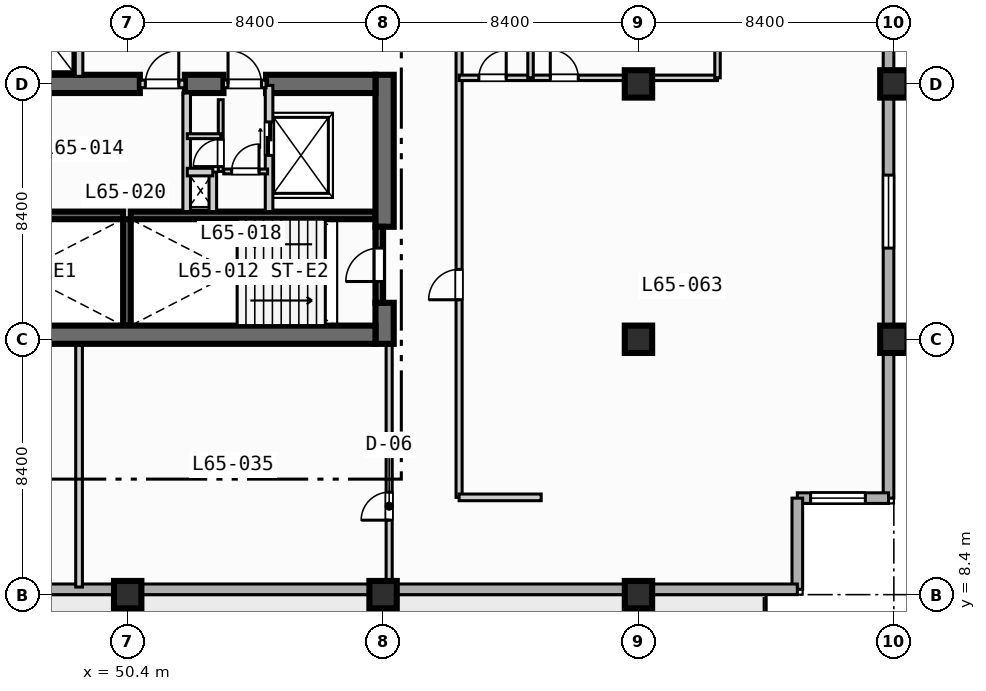
"""IFC4 building model, lengths in metres.
Left out: names, types, materials, properties, quantities, classifications, styles, units other than length and angle.
Written with IfcOpenShell. Run it as: python <this file> out.ifc"""

import sys

from ifc_helpers import new_model, si_unit, direction, frame, frame_2d, origin, origin_2d, place, context, subcontext, project, spatial, rectangle, extrude, element, fill, save


model = new_model("IFC4")
c1 = context("Model", 3, precision=1e-05, world=origin(), true_north=direction((0.0, 1.0)))
c2 = subcontext(c1, "Body", "Model", "MODEL_VIEW")
j1 = project(units=[si_unit("LENGTHUNIT", "METRE"), si_unit("PLANEANGLEUNIT", "RADIAN")], contexts=[c1])
p1 = place(None, origin())
s1 = spatial("IfcSite", under=j1, at=p1, CompositionType="ELEMENT")
p2 = place(p1, origin())
s2 = spatial("IfcBuilding", under=s1, at=p2, CompositionType="ELEMENT")
p3 = place(p2, frame((0.0, 0.0, 263.8)))
s3 = spatial("IfcBuildingStorey", under=s2, at=p3, CompositionType="ELEMENT", Elevation=263.8)
for number, where, z_axis, x_axis in (
    (1, (42.2, 20.875, 0.0), (0.0, 0.0, 1.0), (1.0, 0.0, 0.0)),
    (2, (50.5, 20.875, 0.0), (0.0, 0.0, 1.0), (1.0, 0.0, 0.0)),
):
    element("IfcWall", number, at=place(p3, frame(where, z_axis=z_axis, x_axis=x_axis)), inside=s3, PredefinedType="SOLIDWALL", context=c2, shape_type="SweptSolid", body=[
        extrude(rectangle(XDim=8.05, YDim=0.25, at=frame_2d((4.025, 0.0))), origin(), (0.0, 0.0, 1.0), 3.47),
    ])
p4 = place(p3, frame((50.375, 17.25, 0.0), z_axis=(0.0, 0.0, 1.0), x_axis=(0.0, 1.0, 0.0)))
e3 = element("IfcWall", 3, at=p4, inside=s3, PredefinedType="SOLIDWALL", context=c2, shape_type="SweptSolid", body=[
    extrude(rectangle(XDim=3.5, YDim=0.25, at=frame_2d((1.75, 0.0))), origin(), (0.0, 0.0, 1.0), 3.47),
])
p5 = place(p3, frame((58.85, 16.65, 0.0), z_axis=(0.0, 0.0, 1.0), x_axis=(0.0, 1.0, 0.0)))
e4 = element("IfcWall", 4, at=p5, inside=s3, PredefinedType="SHEAR", context=c2, shape_type="SweptSolid", body=[
    extrude(rectangle(XDim=1.35, YDim=0.6, at=frame_2d((0.675, 0.0))), origin(), (0.0, 0.0, 1.0), 3.47),
])
p6 = place(p3, frame((58.85, 20.5, 0.0), z_axis=(0.0, 0.0, 1.0), x_axis=(0.0, 1.0, 0.0)))
e5 = element("IfcWall", 5, at=p6, inside=s3, PredefinedType="SHEAR", context=c2, shape_type="SweptSolid", body=[
    extrude(rectangle(XDim=5.0, YDim=0.6, at=frame_2d((2.5, 0.0))), origin(), (0.0, 0.0, 1.0), 3.47),
])
p7 = place(p3, frame((42.2, 16.95, 0.0), z_axis=(0.0, 0.0, 1.0), x_axis=(1.0, 0.0, 0.0)))
e6 = element("IfcWall", 6, at=p7, inside=s3, PredefinedType="SHEAR", context=c2, shape_type="SweptSolid", body=[
    extrude(rectangle(XDim=16.35, YDim=0.6, at=frame_2d((8.175, 0.0))), origin(), (0.0, 0.0, 1.0), 3.47),
])
p8 = place(p3, frame((42.2, 25.2, 0.0), z_axis=(0.0, 0.0, 1.0), x_axis=(1.0, 0.0, 0.0)))
e7 = element("IfcWall", 7, at=p8, inside=s3, PredefinedType="SHEAR", context=c2, shape_type="SweptSolid", body=[
    extrude(rectangle(XDim=8.6, YDim=0.6, at=frame_2d((4.3, 0.0))), origin(), (0.0, 0.0, 1.0), 3.47),
])
p9 = place(p3, frame((52.28, 25.2, 0.0), z_axis=(0.0, 0.0, 1.0), x_axis=(1.0, 0.0, 0.0)))
e8 = element("IfcWall", 8, at=p9, inside=s3, PredefinedType="SHEAR", context=c2, shape_type="SweptSolid", body=[
    extrude(rectangle(XDim=1.27, YDim=0.6, at=frame_2d((0.635, 0.0))), origin(), (0.0, 0.0, 1.0), 3.47),
])
p10 = place(p3, frame((54.95, 25.2, 0.0), z_axis=(0.0, 0.0, 1.0), x_axis=(1.0, 0.0, 0.0)))
e9 = element("IfcWall", 9, at=p10, inside=s3, PredefinedType="SHEAR", context=c2, shape_type="SweptSolid", body=[
    extrude(rectangle(XDim=3.6, YDim=0.6, at=frame_2d((1.8, 0.0))), origin(), (0.0, 0.0, 1.0), 3.47),
])
for number, where, z_axis, x_axis in (
    (10, (50.4, 8.4, 0.0), (0.0, 0.0, 1.0), (1.0, 0.0, 0.0)),
    (11, (58.8, 8.4, 0.0), (0.0, 0.0, 1.0), (1.0, 0.0, 0.0)),
    (12, (67.2, 8.4, 0.0), (0.0, 0.0, 1.0), (1.0, 0.0, 0.0)),
    (13, (67.2, 16.8, 0.0), (0.0, 0.0, 1.0), (1.0, 0.0, 0.0)),
    (14, (67.2, 25.2, 0.0), (0.0, 0.0, 1.0), (1.0, 0.0, 0.0)),
    (15, (75.6, 16.8, 0.0), (0.0, 0.0, 1.0), (1.0, 0.0, 0.0)),
    (16, (75.6, 25.2, 0.0), (0.0, 0.0, 1.0), (1.0, 0.0, 0.0)),
):
    element("IfcColumn", number, at=place(p3, frame(where, z_axis=z_axis, x_axis=x_axis)), inside=s3, PredefinedType="COLUMN", context=c2, shape_type="SweptSolid", body=[
        extrude(rectangle(XDim=0.9, YDim=0.9, at=origin_2d()), origin(), (0.0, 0.0, 1.0), 3.7),
    ])
p11 = place(p3, frame((75.425, 30.425, 0.0), z_axis=(0.0, 0.0, 1.0), x_axis=(0.0, -1.0, 0.0)))
e17 = element("IfcWall", 17, at=p11, inside=s3, PredefinedType="STANDARD", context=c2, shape_type="SweptSolid", body=[
    extrude(rectangle(XDim=18.85, YDim=0.35, at=frame_2d((9.425, 0.0))), origin(), (0.0, 0.0, 1.0), 3.47),
])
p12 = place(p11, frame((8.225, 0.0, 0.85)))
e18 = element("IfcOpeningElement", 18, at=p12, cuts=e17, PredefinedType="OPENING", context=c2, shape_type="SweptSolid", body=[
    extrude(rectangle(XDim=2.4, YDim=1.95, at=frame_2d((1.2, 0.975))), frame((0.0, 0.185, 0.0), z_axis=(0.0, -1.0, 0.0), x_axis=(1.0, 0.0, 0.0)), (0.0, 0.0, 1.0), 0.37),
])
p13 = place(p3, frame((75.425, 11.575, 0.0), z_axis=(0.0, 0.0, 1.0), x_axis=(-1.0, 0.0, 0.0)))
e19 = element("IfcWall", 19, at=p13, inside=s3, PredefinedType="STANDARD", context=c2, shape_type="SweptSolid", body=[
    extrude(rectangle(XDim=3.0, YDim=0.35, at=frame_2d((1.5, 0.0))), origin(), (0.0, 0.0, 1.0), 3.47),
])
p14 = place(p13, frame((0.762, 0.0, 0.85)))
e20 = element("IfcOpeningElement", 20, at=p14, cuts=e19, PredefinedType="OPENING", context=c2, shape_type="SweptSolid", body=[
    extrude(rectangle(XDim=1.8, YDim=1.8, at=frame_2d((0.9, 0.9))), frame((0.0, 0.185, 0.0), z_axis=(0.0, -1.0, 0.0), x_axis=(1.0, 0.0, 0.0)), (0.0, 0.0, 1.0), 0.37),
])
p15 = place(p3, frame((72.425, 11.575, 0.0), z_axis=(0.0, 0.0, 1.0), x_axis=(0.0, -1.0, 0.0)))
e21 = element("IfcWall", 21, at=p15, inside=s3, PredefinedType="STANDARD", context=c2, shape_type="SweptSolid", body=[
    extrude(rectangle(XDim=3.0, YDim=0.35, at=frame_2d((1.5, 0.0))), origin(), (0.0, 0.0, 1.0), 3.47),
])
p16 = place(p3, frame((72.425, 8.575, 0.0), z_axis=(0.0, 0.0, 1.0), x_axis=(-1.0, 0.0, 0.0)))
e22 = element("IfcWall", 22, at=p16, inside=s3, PredefinedType="STANDARD", context=c2, shape_type="SweptSolid", body=[
    extrude(rectangle(XDim=60.85, YDim=0.35, at=frame_2d((30.425, 0.0))), origin(), (0.0, 0.0, 1.0), 3.47),
])
p17 = place(p16, frame((41.325, 0.0, 0.0)))
e23 = element("IfcOpeningElement", 23, at=p17, cuts=e22, PredefinedType="OPENING", context=c2, shape_type="SweptSolid", body=[
    extrude(rectangle(XDim=1.4, YDim=2.2, at=frame_2d((0.7, 1.1))), frame((0.0, 0.185, 0.0), z_axis=(0.0, -1.0, 0.0), x_axis=(1.0, 0.0, 0.0)), (0.0, 0.0, 1.0), 0.37),
])
p18 = place(p16, frame((50.225, 0.0, 0.85)))
e24 = element("IfcOpeningElement", 24, at=p18, cuts=e22, PredefinedType="OPENING", context=c2, shape_type="SweptSolid", body=[
    extrude(rectangle(XDim=2.4, YDim=1.95, at=frame_2d((1.2, 0.975))), frame((0.0, 0.185, 0.0), z_axis=(0.0, -1.0, 0.0), x_axis=(1.0, 0.0, 0.0)), (0.0, 0.0, 1.0), 0.37),
])
p19 = place(p16, frame((33.425, 0.0, 0.85)))
e25 = element("IfcOpeningElement", 25, at=p19, cuts=e22, PredefinedType="OPENING", context=c2, shape_type="SweptSolid", body=[
    extrude(rectangle(XDim=2.4, YDim=1.95, at=frame_2d((1.2, 0.975))), frame((0.0, 0.185, 0.0), z_axis=(0.0, -1.0, 0.0), x_axis=(1.0, 0.0, 0.0)), (0.0, 0.0, 1.0), 0.37),
])
p20 = place(p16, frame((25.325, 0.0, 0.85)))
e26 = element("IfcOpeningElement", 26, at=p20, cuts=e22, PredefinedType="OPENING", context=c2, shape_type="SweptSolid", body=[
    extrude(rectangle(XDim=1.8, YDim=1.8, at=frame_2d((0.9, 0.9))), frame((0.0, 0.185, 0.0), z_axis=(0.0, -1.0, 0.0), x_axis=(1.0, 0.0, 0.0)), (0.0, 0.0, 1.0), 0.37),
])
p21 = place(p16, frame((58.15, 0.0, 0.85)))
e27 = element("IfcOpeningElement", 27, at=p21, cuts=e22, PredefinedType="OPENING", context=c2, shape_type="SweptSolid", body=[
    extrude(rectangle(XDim=1.8, YDim=1.8, at=frame_2d((0.9, 0.9))), frame((0.0, 0.185, 0.0), z_axis=(0.0, -1.0, 0.0), x_axis=(1.0, 0.0, 0.0)), (0.0, 0.0, 1.0), 0.37),
])
p22 = place(p16, frame((56.29, 0.0, 0.85)))
e28 = element("IfcOpeningElement", 28, at=p22, cuts=e22, PredefinedType="OPENING", context=c2, shape_type="SweptSolid", body=[
    extrude(rectangle(XDim=0.72, YDim=1.8, at=frame_2d((0.36, 0.9))), frame((0.0, 0.185, 0.0), z_axis=(0.0, -1.0, 0.0), x_axis=(1.0, 0.0, 0.0)), (0.0, 0.0, 1.0), 0.37),
])
p23 = place(p16, frame((44.15, 0.0, 0.85)))
e29 = element("IfcOpeningElement", 29, at=p23, cuts=e22, PredefinedType="OPENING", context=c2, shape_type="SweptSolid", body=[
    extrude(rectangle(XDim=1.8, YDim=1.8, at=frame_2d((0.9, 0.9))), frame((0.0, 0.185, 0.0), z_axis=(0.0, -1.0, 0.0), x_axis=(1.0, 0.0, 0.0)), (0.0, 0.0, 1.0), 0.37),
])
p24 = place(p3, frame((58.675, 18.0, 0.0), z_axis=(0.0, 0.0, 1.0), x_axis=(0.0, 1.0, 0.0)))
e30 = element("IfcWall", 30, at=p24, inside=s3, PredefinedType="SOLIDWALL", context=c2, shape_type="SweptSolid", body=[
    extrude(rectangle(XDim=2.5, YDim=0.25, at=frame_2d((1.25, 0.0))), origin(), (0.0, 0.0, 1.0), 3.47),
])
p25 = place(p24, frame((0.7, 0.0, 0.0)))
e31 = element("IfcOpeningElement", 31, at=p25, cuts=e30, PredefinedType="OPENING", context=c2, shape_type="SweptSolid", body=[
    extrude(rectangle(XDim=1.1, YDim=2.15, at=frame_2d((0.55, 1.075))), frame((0.0, 0.135, 0.0), z_axis=(0.0, -1.0, 0.0), x_axis=(1.0, 0.0, 0.0)), (0.0, 0.0, 1.0), 0.27),
])
p26 = place(p3, frame((50.8, 25.2, 0.0), z_axis=(0.0, 0.0, 1.0), x_axis=(1.0, 0.0, 0.0)))
e32 = element("IfcWall", 32, at=p26, inside=s3, PredefinedType="SOLIDWALL", context=c2, shape_type="SweptSolid", body=[
    extrude(rectangle(XDim=1.48, YDim=0.25, at=frame_2d((0.74, 0.0))), origin(), (0.0, 0.0, 1.0), 3.47),
])
p27 = place(p26, frame((0.18, 0.0, 0.0)))
e33 = element("IfcOpeningElement", 33, at=p27, cuts=e32, PredefinedType="OPENING", context=c2, shape_type="SweptSolid", body=[
    extrude(rectangle(XDim=1.1, YDim=2.15, at=frame_2d((0.55, 1.075))), frame((0.0, 0.135, 0.0), z_axis=(0.0, -1.0, 0.0), x_axis=(1.0, 0.0, 0.0)), (0.0, 0.0, 1.0), 0.27),
])
p28 = place(p3, frame((52.34, 21.0, 0.0), z_axis=(0.0, 0.0, 1.0), x_axis=(0.0, 1.0, 0.0)))
e34 = element("IfcWall", 34, at=p28, inside=s3, PredefinedType="SOLIDWALL", context=c2, shape_type="SweptSolid", body=[
    extrude(rectangle(XDim=3.9, YDim=0.25, at=frame_2d((1.95, 0.0))), origin(), (0.0, 0.0, 1.0), 3.47),
])
p29 = place(p3, frame((55.05, 21.0, 0.0), z_axis=(0.0, 0.0, 1.0), x_axis=(0.0, 1.0, 0.0)))
e35 = element("IfcWall", 35, at=p29, inside=s3, PredefinedType="SOLIDWALL", context=c2, shape_type="SweptSolid", body=[
    extrude(rectangle(XDim=4.15, YDim=0.25, at=frame_2d((2.075, 0.0))), origin(), (0.0, 0.0, 1.0), 3.47),
])
p30 = place(p29, frame((1.85, 0.0, 0.0)))
e36 = element("IfcOpeningElement", 36, at=p30, cuts=e35, PredefinedType="OPENING", context=c2, shape_type="SweptSolid", body=[
    extrude(rectangle(XDim=1.1, YDim=2.15, at=frame_2d((0.55, 1.075))), frame((0.0, 0.135, 0.0), z_axis=(0.0, -1.0, 0.0), x_axis=(1.0, 0.0, 0.0)), (0.0, 0.0, 1.0), 0.27),
])
p31 = place(p3, frame((53.55, 25.2, 0.0), z_axis=(0.0, 0.0, 1.0), x_axis=(1.0, 0.0, 0.0)))
e37 = element("IfcWall", 37, at=p31, inside=s3, PredefinedType="SOLIDWALL", context=c2, shape_type="SweptSolid", body=[
    extrude(rectangle(XDim=1.4, YDim=0.25, at=frame_2d((0.7, 0.0))), origin(), (0.0, 0.0, 1.0), 3.47),
])
p32 = place(p31, frame((0.15, 0.0, 0.0)))
e38 = element("IfcOpeningElement", 38, at=p32, cuts=e37, PredefinedType="OPENING", context=c2, shape_type="SweptSolid", body=[
    extrude(rectangle(XDim=1.1, YDim=2.15, at=frame_2d((0.55, 1.075))), frame((0.0, 0.135, 0.0), z_axis=(0.0, -1.0, 0.0), x_axis=(1.0, 0.0, 0.0)), (0.0, 0.0, 1.0), 0.27),
])
p33 = place(p3, frame((53.2, 21.0, 0.0), z_axis=(0.0, 0.0, 1.0), x_axis=(0.0, 1.0, 0.0)))
e39 = element("IfcWall", 39, at=p33, inside=s3, PredefinedType="SOLIDWALL", context=c2, shape_type="SweptSolid", body=[
    extrude(rectangle(XDim=1.3, YDim=0.25, at=frame_2d((0.65, 0.0))), origin(), (0.0, 0.0, 1.0), 3.47),
])
p34 = place(p3, frame((52.36, 22.3, 0.0), z_axis=(0.0, 0.0, 1.0), x_axis=(1.0, 0.0, 0.0)))
e40 = element("IfcWall", 40, at=p34, inside=s3, PredefinedType="SOLIDWALL", context=c2, shape_type="SweptSolid", body=[
    extrude(rectangle(XDim=0.84, YDim=0.25, at=frame_2d((0.42, 0.0))), origin(), (0.0, 0.0, 1.0), 3.47),
])
p35 = place(p3, frame((53.56, 22.32, 0.0), z_axis=(0.0, 0.0, 1.0), x_axis=(1.0, 0.0, 0.0)))
e41 = element("IfcWall", 41, at=p35, inside=s3, PredefinedType="PARTITIONING", context=c2, shape_type="SweptSolid", body=[
    extrude(rectangle(XDim=1.44, YDim=0.16, at=frame_2d((0.72, 0.0))), origin(), (0.0, 0.0, 1.0), 3.47),
])
p36 = place(p35, frame((0.26, 0.0, 0.0)))
e42 = element("IfcOpeningElement", 42, at=p36, cuts=e41, PredefinedType="OPENING", context=c2, shape_type="SweptSolid", body=[
    extrude(rectangle(XDim=0.9, YDim=2.1, at=frame_2d((0.45, 1.05))), frame((0.0, 0.09, 0.0), z_axis=(0.0, -1.0, 0.0), x_axis=(1.0, 0.0, 0.0)), (0.0, 0.0, 1.0), 0.18),
])
p37 = place(p3, frame((53.46, 22.32, 0.0), z_axis=(0.0, 0.0, 1.0), x_axis=(0.0, 1.0, 0.0)))
e43 = element("IfcWall", 43, at=p37, inside=s3, PredefinedType="PARTITIONING", context=c2, shape_type="SweptSolid", body=[
    extrude(rectangle(XDim=2.36, YDim=0.16, at=frame_2d((1.18, 0.0))), origin(), (0.0, 0.0, 1.0), 3.47),
])
p38 = place(p37, frame((0.16, 0.0, 0.0)))
e44 = element("IfcOpeningElement", 44, at=p38, cuts=e43, PredefinedType="OPENING", context=c2, shape_type="SweptSolid", body=[
    extrude(rectangle(XDim=0.9, YDim=2.1, at=frame_2d((0.45, 1.05))), frame((0.0, 0.09, 0.0), z_axis=(0.0, -1.0, 0.0), x_axis=(1.0, 0.0, 0.0)), (0.0, 0.0, 1.0), 0.18),
])
p39 = place(p3, frame((52.36, 23.48, 0.0), z_axis=(0.0, 0.0, 1.0), x_axis=(1.0, 0.0, 0.0)))
e45 = element("IfcWall", 45, at=p39, inside=s3, PredefinedType="PARTITIONING", context=c2, shape_type="SweptSolid", body=[
    extrude(rectangle(XDim=1.1, YDim=0.16, at=frame_2d((0.55, 0.0))), origin(), (0.0, 0.0, 1.0), 3.47),
])
p40 = place(p3, frame((48.8, 25.45, 0.0), z_axis=(0.0, 0.0, 1.0), x_axis=(0.0, 1.0, 0.0)))
e46 = element("IfcWall", 46, at=p40, inside=s3, PredefinedType="SOLIDWALL", context=c2, shape_type="SweptSolid", body=[
    extrude(rectangle(XDim=2.325, YDim=0.25, at=frame_2d((1.163, 0.0))), origin(), (0.0, 0.0, 1.0), 3.47),
])
p41 = place(p3, frame((59.0, 8.65, 0.0), z_axis=(0.0, 0.0, 1.0), x_axis=(0.0, 1.0, 0.0)))
e47 = element("IfcWall", 47, at=p41, inside=s3, PredefinedType="PARTITIONING", context=c2, shape_type="SweptSolid", body=[
    extrude(rectangle(XDim=7.95, YDim=0.2, at=frame_2d((3.975, 0.0))), origin(), (0.0, 0.0, 1.0), 2.82),
])
p42 = place(p41, frame((2.2, 0.0, 0.0)))
e48 = element("IfcOpeningElement", 48, at=p42, cuts=e47, PredefinedType="OPENING", context=c2, shape_type="SweptSolid", body=[
    extrude(rectangle(XDim=0.92, YDim=2.1, at=frame_2d((0.46, 1.05))), frame((0.0, 0.11, 0.0), z_axis=(0.0, -1.0, 0.0), x_axis=(1.0, 0.0, 0.0)), (0.0, 0.0, 1.0), 0.22),
])
p43 = place(p3, frame((48.8, 8.65, 0.0), z_axis=(0.0, 0.0, 1.0), x_axis=(0.0, 1.0, 0.0)))
e49 = element("IfcWall", 49, at=p43, inside=s3, PredefinedType="PARTITIONING", context=c2, shape_type="SweptSolid", body=[
    extrude(rectangle(XDim=7.95, YDim=0.22, at=frame_2d((3.975, 0.0))), origin(), (0.0, 0.0, 1.0), 3.47),
])
p44 = place(p3, frame((61.3, 11.6, 0.0), z_axis=(0.0, 0.0, 1.0), x_axis=(0.0, 1.0, 0.0)))
e50 = element("IfcWall", 50, at=p44, inside=s3, PredefinedType="PARTITIONING", context=c2, shape_type="SweptSolid", body=[
    extrude(rectangle(XDim=18.8, YDim=0.2, at=frame_2d((9.4, 0.0))), origin(), (0.0, 0.0, 1.0), 3.47),
])
p45 = place(p44, frame((6.5, 0.0, 0.0)))
e51 = element("IfcOpeningElement", 51, at=p45, cuts=e50, PredefinedType="OPENING", context=c2, shape_type="SweptSolid", body=[
    extrude(rectangle(XDim=1.0, YDim=2.15, at=frame_2d((0.5, 1.075))), frame((0.0, 0.11, 0.0), z_axis=(0.0, -1.0, 0.0), x_axis=(1.0, 0.0, 0.0)), (0.0, 0.0, 1.0), 0.22),
])
p46 = place(p3, frame((61.3, 25.4, 0.0), z_axis=(0.0, 0.0, 1.0), x_axis=(1.0, 0.0, 0.0)))
e52 = element("IfcWall", 52, at=p46, inside=s3, PredefinedType="PLUMBINGWALL", context=c2, shape_type="SweptSolid", body=[
    extrude(rectangle(XDim=8.5, YDim=0.18, at=frame_2d((4.25, 0.0))), origin(), (0.0, 0.0, 1.0), 2.82),
])
p47 = place(p46, frame((0.65, 0.0, 0.0)))
e53 = element("IfcOpeningElement", 53, at=p47, cuts=e52, PredefinedType="OPENING", context=c2, shape_type="SweptSolid", body=[
    extrude(rectangle(XDim=0.9, YDim=2.1, at=frame_2d((0.45, 1.05))), frame((0.0, 0.1, 0.0), z_axis=(0.0, -1.0, 0.0), x_axis=(1.0, 0.0, 0.0)), (0.0, 0.0, 1.0), 0.2),
])
p48 = place(p46, frame((3.0, 0.0, 0.0)))
e54 = element("IfcOpeningElement", 54, at=p48, cuts=e52, PredefinedType="OPENING", context=c2, shape_type="SweptSolid", body=[
    extrude(rectangle(XDim=0.92, YDim=2.1, at=frame_2d((0.46, 1.05))), frame((0.0, 0.1, 0.0), z_axis=(0.0, -1.0, 0.0), x_axis=(1.0, 0.0, 0.0)), (0.0, 0.0, 1.0), 0.2),
])
for number, where, z_axis, x_axis in (
    (55, (63.65, 25.4, 0.0), (0.0, 0.0, 1.0), (0.0, 1.0, 0.0)),
    (56, (69.8, 25.4, 0.0), (0.0, 0.0, 1.0), (0.0, 1.0, 0.0)),
):
    element("IfcWall", number, at=place(p3, frame(where, z_axis=z_axis, x_axis=x_axis)), inside=s3, PredefinedType="PLUMBINGWALL", context=c2, shape_type="SweptSolid", body=[
        extrude(rectangle(XDim=5.0, YDim=0.18, at=frame_2d((2.5, 0.0))), origin(), (0.0, 0.0, 1.0), 3.47),
    ])
p49 = place(p3, frame((61.3, 11.6, 0.0), z_axis=(0.0, 0.0, 1.0), x_axis=(1.0, 0.0, 0.0)))
e57 = element("IfcWall", 57, at=p49, inside=s3, PredefinedType="PARTITIONING", context=c2, shape_type="SweptSolid", body=[
    extrude(rectangle(XDim=2.7, YDim=0.22, at=frame_2d((1.35, 0.0))), origin(), (0.0, 0.0, 1.0), 3.47),
])
p50 = place(p12, origin())
e58 = element("IfcWindow", 58, at=p50, inside=s3, PartitioningType="SINGLE_PANEL", PredefinedType="WINDOW", context=c2, shape_type="SweptSolid", body=[
    extrude(rectangle(XDim=2.4, YDim=1.95, at=frame_2d((1.2, 0.975))), frame((0.0, 0.03, 0.0), z_axis=(0.0, -1.0, 0.0), x_axis=(1.0, 0.0, 0.0)), (0.0, 0.0, 1.0), 0.06),
])
fill(e18, e58)
p51 = place(p14, origin())
e59 = element("IfcWindow", 59, at=p51, inside=s3, PartitioningType="SINGLE_PANEL", PredefinedType="WINDOW", context=c2, shape_type="SweptSolid", body=[
    extrude(rectangle(XDim=1.8, YDim=1.8, at=frame_2d((0.9, 0.9))), frame((0.0, 0.03, 0.0), z_axis=(0.0, -1.0, 0.0), x_axis=(1.0, 0.0, 0.0)), (0.0, 0.0, 1.0), 0.06),
])
fill(e20, e59)
p52 = place(p25, origin())
e60 = element("IfcDoor", 60, at=p52, inside=s3, OperationType="SINGLE_SWING_LEFT", PredefinedType="DOOR", context=c2, shape_type="SweptSolid", body=[
    extrude(rectangle(XDim=1.1, YDim=2.15, at=frame_2d((0.55, 1.075))), frame((0.0, 0.025, 0.0), z_axis=(0.0, -1.0, 0.0), x_axis=(1.0, 0.0, 0.0)), (0.0, 0.0, 1.0), 0.05),
])
fill(e31, e60)
p53 = place(p27, origin())
e61 = element("IfcDoor", 61, at=p53, inside=s3, OperationType="SINGLE_SWING_RIGHT", PredefinedType="DOOR", context=c2, shape_type="SweptSolid", body=[
    extrude(rectangle(XDim=1.1, YDim=2.15, at=frame_2d((0.55, 1.075))), frame((0.0, 0.025, 0.0), z_axis=(0.0, -1.0, 0.0), x_axis=(1.0, 0.0, 0.0)), (0.0, 0.0, 1.0), 0.05),
])
fill(e33, e61)
p54 = place(p30, origin())
e62 = element("IfcDoor", 62, at=p54, inside=s3, OperationType="SLIDING_TO_LEFT", PredefinedType="DOOR", context=c2, shape_type="SweptSolid", body=[
    extrude(rectangle(XDim=1.1, YDim=2.15, at=frame_2d((0.55, 1.075))), frame((0.0, 0.025, 0.0), z_axis=(0.0, -1.0, 0.0), x_axis=(1.0, 0.0, 0.0)), (0.0, 0.0, 1.0), 0.05),
])
fill(e36, e62)
p55 = place(p32, origin())
e63 = element("IfcDoor", 63, at=p55, inside=s3, OperationType="SINGLE_SWING_LEFT", PredefinedType="DOOR", context=c2, shape_type="SweptSolid", body=[
    extrude(rectangle(XDim=1.1, YDim=2.15, at=frame_2d((0.55, 1.075))), frame((0.0, 0.025, 0.0), z_axis=(0.0, -1.0, 0.0), x_axis=(1.0, 0.0, 0.0)), (0.0, 0.0, 1.0), 0.05),
])
fill(e38, e63)
p56 = place(p36, origin())
e64 = element("IfcDoor", 64, at=p56, inside=s3, OperationType="SINGLE_SWING_RIGHT", PredefinedType="DOOR", context=c2, shape_type="SweptSolid", body=[
    extrude(rectangle(XDim=0.9, YDim=2.1, at=frame_2d((0.45, 1.05))), frame((0.0, 0.025, 0.0), z_axis=(0.0, -1.0, 0.0), x_axis=(1.0, 0.0, 0.0)), (0.0, 0.0, 1.0), 0.05),
])
fill(e42, e64)
p57 = place(p38, origin())
e65 = element("IfcDoor", 65, at=p57, inside=s3, OperationType="SINGLE_SWING_LEFT", PredefinedType="DOOR", context=c2, shape_type="SweptSolid", body=[
    extrude(rectangle(XDim=0.9, YDim=2.1, at=frame_2d((0.45, 1.05))), frame((0.0, 0.025, 0.0), z_axis=(0.0, -1.0, 0.0), x_axis=(1.0, 0.0, 0.0)), (0.0, 0.0, 1.0), 0.05),
])
fill(e44, e65)
p58 = place(p42, origin())
e66 = element("IfcDoor", 66, at=p58, inside=s3, OperationType="SINGLE_SWING_LEFT", PredefinedType="DOOR", context=c2, shape_type="SweptSolid", body=[
    extrude(rectangle(XDim=0.92, YDim=2.1, at=frame_2d((0.46, 1.05))), frame((0.0, 0.025, 0.0), z_axis=(0.0, -1.0, 0.0), x_axis=(1.0, 0.0, 0.0)), (0.0, 0.0, 1.0), 0.05),
])
fill(e48, e66)
p59 = place(p45, origin())
e67 = element("IfcDoor", 67, at=p59, inside=s3, OperationType="SINGLE_SWING_LEFT", PredefinedType="DOOR", context=c2, shape_type="SweptSolid", body=[
    extrude(rectangle(XDim=1.0, YDim=2.15, at=frame_2d((0.5, 1.075))), frame((0.0, 0.025, 0.0), z_axis=(0.0, -1.0, 0.0), x_axis=(1.0, 0.0, 0.0)), (0.0, 0.0, 1.0), 0.05),
])
fill(e51, e67)
p60 = place(p47, origin())
e68 = element("IfcDoor", 68, at=p60, inside=s3, OperationType="SINGLE_SWING_RIGHT", PredefinedType="DOOR", context=c2, shape_type="SweptSolid", body=[
    extrude(rectangle(XDim=0.9, YDim=2.1, at=frame_2d((0.45, 1.05))), frame((0.0, 0.025, 0.0), z_axis=(0.0, -1.0, 0.0), x_axis=(1.0, 0.0, 0.0)), (0.0, 0.0, 1.0), 0.05),
])
fill(e53, e68)
p61 = place(p48, origin())
e69 = element("IfcDoor", 69, at=p61, inside=s3, OperationType="SINGLE_SWING_LEFT", PredefinedType="DOOR", context=c2, shape_type="SweptSolid", body=[
    extrude(rectangle(XDim=0.92, YDim=2.1, at=frame_2d((0.46, 1.05))), frame((0.0, 0.025, 0.0), z_axis=(0.0, -1.0, 0.0), x_axis=(1.0, 0.0, 0.0)), (0.0, 0.0, 1.0), 0.05),
])
fill(e54, e69)
save(model, sys.argv[1])
